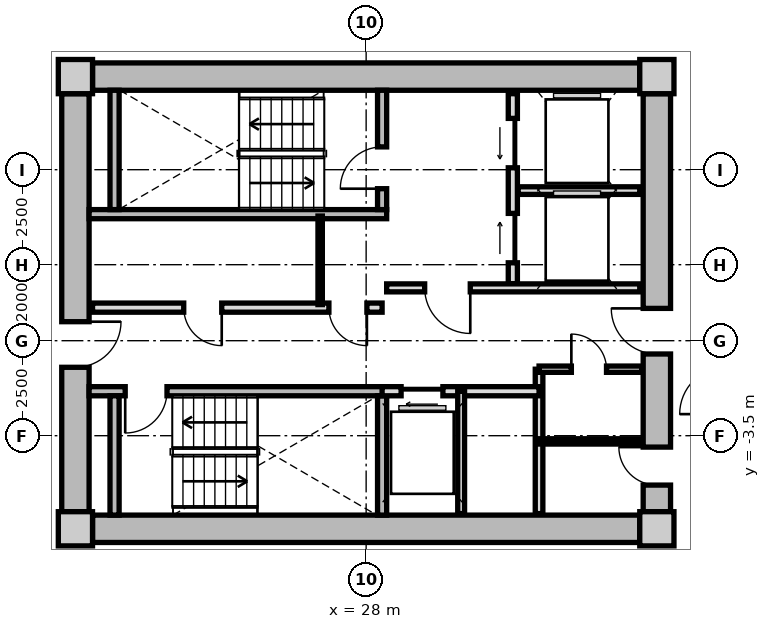
"""IFC4 building model, lengths in metres.
Left out: names, types, materials, properties, quantities, classifications, styles, units other than length and angle.
Written with IfcOpenShell. Run it as: python <this file> out.ifc"""

import sys

from ifc_helpers import new_model, si_unit, direction, frame, frame_2d, origin, origin_2d, place, context, subcontext, project, spatial, rectangle, extrude, source, transform, mapped, element, fill, save


model = new_model("IFC4")
c1 = context("Model", 3, precision=1e-05, world=origin(), true_north=direction((0.0, 1.0)))
c2 = subcontext(c1, "Body", "Model", "MODEL_VIEW")
j1 = project(units=[si_unit("LENGTHUNIT", "METRE"), si_unit("PLANEANGLEUNIT", "RADIAN")], contexts=[c1])
p1 = place(None, origin())
s1 = spatial("IfcSite", under=j1, at=p1, CompositionType="ELEMENT")
p2 = place(p1, origin())
s2 = spatial("IfcBuilding", under=s1, at=p2, CompositionType="ELEMENT")
p3 = place(p2, frame((0.0, 0.0, 96.25)))
s3 = spatial("IfcBuildingStorey", under=s2, at=p3, CompositionType="ELEMENT", Elevation=96.25)
m1 = source(origin(), c2, "Body", "SweptSolid", [
    extrude(rectangle(XDim=0.9, YDim=0.9, at=origin_2d()), origin(), (0.0, 0.0, 1.0), 3.05),
])
for number, where, z_axis, x_axis in (
    (1, (20.35, -5.95, 0.0), (0.0, 0.0, 1.0), (1.0, 0.0, 0.0)),
    (2, (35.65, -5.95, 0.0), (0.0, 0.0, 1.0), (1.0, 0.0, 0.0)),
    (3, (35.65, 5.95, 0.0), (0.0, 0.0, 1.0), (1.0, 0.0, 0.0)),
    (4, (20.35, 5.95, 0.0), (0.0, 0.0, 1.0), (1.0, 0.0, 0.0)),
):
    element("IfcColumn", number, at=place(p3, frame(where, z_axis=z_axis, x_axis=x_axis)), inside=s3, PredefinedType="COLUMN", context=c2, shape_type="MappedRepresentation", body=[
        mapped(m1, transform((0.0, 0.0, 0.0), x_axis=(1.0, 0.0, 0.0), y_axis=(0.0, 1.0, 0.0), z_axis=(0.0, 0.0, 1.0), scale=1.0)),
    ])
m2 = source(origin(), c2, "Body", "SweptSolid", [
    extrude(rectangle(XDim=14.4, YDim=0.72, at=frame_2d((7.2, 0.0))), origin(), (0.0, 0.0, 1.0), 2.79),
])
for number, where, z_axis, x_axis in (
    (5, (20.8, 5.95, 0.0), (0.0, 0.0, 1.0), (1.0, 0.0, 0.0)),
    (6, (35.2, -5.95, 0.0), (0.0, 0.0, 1.0), (-1.0, 0.0, 0.0)),
):
    element("IfcWall", number, at=place(p3, frame(where, z_axis=z_axis, x_axis=x_axis)), inside=s3, PredefinedType="SHEAR", context=c2, shape_type="MappedRepresentation", body=[
        mapped(m2, transform((0.0, 0.0, 0.0), x_axis=(1.0, 0.0, 0.0), y_axis=(0.0, 1.0, 0.0), z_axis=(0.0, 0.0, 1.0), scale=1.0)),
    ])
m3 = source(origin(), c2, "Body", "SweptSolid", [
    extrude(rectangle(XDim=11.0, YDim=0.72, at=frame_2d((5.5, 0.0))), origin(), (0.0, 0.0, 1.0), 2.79),
])
p4 = place(p3, frame((20.35, -5.5, 0.0), z_axis=(0.0, 0.0, 1.0), x_axis=(0.0, 1.0, 0.0)))
e7 = element("IfcWall", 7, at=p4, inside=s3, PredefinedType="SHEAR", context=c2, shape_type="MappedRepresentation", body=[
    mapped(m3, transform((0.0, 0.0, 0.0), x_axis=(1.0, 0.0, 0.0), y_axis=(0.0, 1.0, 0.0), z_axis=(0.0, 0.0, 1.0), scale=1.0)),
])
p5 = place(p4, frame((3.8, 0.0, 0.0)))
e8 = element("IfcOpeningElement", 8, at=p5, cuts=e7, PredefinedType="OPENING", context=c2, shape_type="SweptSolid", body=[
    extrude(rectangle(XDim=1.2, YDim=2.15, at=frame_2d((0.6, 1.075))), frame((0.0, 0.37, 0.0), z_axis=(0.0, -1.0, 0.0), x_axis=(1.0, 0.0, 0.0)), (0.0, 0.0, 1.0), 0.74),
])
p6 = place(p3, frame((35.65, 5.5, 0.0), z_axis=(0.0, 0.0, 1.0), x_axis=(0.0, -1.0, 0.0)))
e9 = element("IfcWall", 9, at=p6, inside=s3, PredefinedType="SHEAR", context=c2, shape_type="MappedRepresentation", body=[
    mapped(m3, transform((0.0, 0.0, 0.0), x_axis=(1.0, 0.0, 0.0), y_axis=(0.0, 1.0, 0.0), z_axis=(0.0, 0.0, 1.0), scale=1.0)),
])
p7 = place(p6, frame((5.65, 0.0, 0.0)))
e10 = element("IfcOpeningElement", 10, at=p7, cuts=e9, PredefinedType="OPENING", context=c2, shape_type="SweptSolid", body=[
    extrude(rectangle(XDim=1.2, YDim=2.15, at=frame_2d((0.6, 1.075))), frame((0.0, 0.37, 0.0), z_axis=(0.0, -1.0, 0.0), x_axis=(1.0, 0.0, 0.0)), (0.0, 0.0, 1.0), 0.74),
])
p8 = place(p6, frame((9.3, 0.0, 0.0)))
e11 = element("IfcOpeningElement", 11, at=p8, cuts=e9, PredefinedType="OPENING", context=c2, shape_type="SweptSolid", body=[
    extrude(rectangle(XDim=1.0, YDim=2.1, at=frame_2d((0.5, 1.05))), frame((0.0, 0.37, 0.0), z_axis=(0.0, -1.0, 0.0), x_axis=(1.0, 0.0, 0.0)), (0.0, 0.0, 1.0), 0.74),
])
m4 = source(origin(), c2, "Body", "SweptSolid", [
    extrude(rectangle(XDim=7.83, YDim=0.24, at=frame_2d((3.915, 0.0))), origin(), (0.0, 0.0, 1.0), 2.79),
])
p9 = place(p3, frame((20.71, 2.33, 0.0), z_axis=(0.0, 0.0, 1.0), x_axis=(1.0, 0.0, 0.0)))
e12 = element("IfcWall", 12, at=p9, inside=s3, PredefinedType="PARTITIONING", context=c2, shape_type="MappedRepresentation", body=[
    mapped(m4, transform((0.0, 0.0, 0.0), x_axis=(1.0, 0.0, 0.0), y_axis=(0.0, 1.0, 0.0), z_axis=(0.0, 0.0, 1.0), scale=1.0)),
])
m5 = source(origin(), c2, "Body", "SweptSolid", [
    extrude(rectangle(XDim=3.14, YDim=0.24, at=frame_2d((1.57, 0.0))), origin(), (0.0, 0.0, 1.0), 2.79),
])
p10 = place(p3, frame((21.38, 2.45, 0.0), z_axis=(0.0, 0.0, 1.0), x_axis=(0.0, 1.0, 0.0)))
e13 = element("IfcWall", 13, at=p10, inside=s3, PredefinedType="PARTITIONING", context=c2, shape_type="MappedRepresentation", body=[
    mapped(m5, transform((0.0, 0.0, 0.0), x_axis=(1.0, 0.0, 0.0), y_axis=(0.0, 1.0, 0.0), z_axis=(0.0, 0.0, 1.0), scale=1.0)),
])
p11 = place(p3, frame((28.42, 2.45, 0.0), z_axis=(0.0, 0.0, 1.0), x_axis=(0.0, 1.0, 0.0)))
e14 = element("IfcWall", 14, at=p11, inside=s3, PredefinedType="PARTITIONING", context=c2, shape_type="MappedRepresentation", body=[
    mapped(m5, transform((0.0, 0.0, 0.0), x_axis=(1.0, 0.0, 0.0), y_axis=(0.0, 1.0, 0.0), z_axis=(0.0, 0.0, 1.0), scale=1.0)),
])
p12 = place(p11, frame((0.55, 0.0, 0.0)))
e15 = element("IfcOpeningElement", 15, at=p12, cuts=e14, PredefinedType="OPENING", context=c2, shape_type="SweptSolid", body=[
    extrude(rectangle(XDim=1.1, YDim=2.15, at=frame_2d((0.55, 1.075))), frame((0.0, 0.13, 0.0), z_axis=(0.0, -1.0, 0.0), x_axis=(1.0, 0.0, 0.0)), (0.0, 0.0, 1.0), 0.26),
])
p13 = place(p3, frame((20.71, -2.33, 0.0), z_axis=(0.0, 0.0, 1.0), x_axis=(1.0, 0.0, 0.0)))
e16 = element("IfcWall", 16, at=p13, inside=s3, PredefinedType="PARTITIONING", context=c2, shape_type="MappedRepresentation", body=[
    mapped(m4, transform((0.0, 0.0, 0.0), x_axis=(1.0, 0.0, 0.0), y_axis=(0.0, 1.0, 0.0), z_axis=(0.0, 0.0, 1.0), scale=1.0)),
])
p14 = place(p13, frame((0.95, 0.0, 0.0)))
e17 = element("IfcOpeningElement", 17, at=p14, cuts=e16, PredefinedType="OPENING", context=c2, shape_type="SweptSolid", body=[
    extrude(rectangle(XDim=1.1, YDim=2.15, at=frame_2d((0.55, 1.075))), frame((0.0, 0.13, 0.0), z_axis=(0.0, -1.0, 0.0), x_axis=(1.0, 0.0, 0.0)), (0.0, 0.0, 1.0), 0.26),
])
for number, where, z_axis, x_axis in (
    (18, (21.38, -5.59, 0.0), (0.0, 0.0, 1.0), (0.0, 1.0, 0.0)),
    (19, (28.42, -5.59, 0.0), (0.0, 0.0, 1.0), (0.0, 1.0, 0.0)),
):
    element("IfcWall", number, at=place(p3, frame(where, z_axis=z_axis, x_axis=x_axis)), inside=s3, PredefinedType="PARTITIONING", context=c2, shape_type="MappedRepresentation", body=[
        mapped(m5, transform((0.0, 0.0, 0.0), x_axis=(1.0, 0.0, 0.0), y_axis=(0.0, 1.0, 0.0), z_axis=(0.0, 0.0, 1.0), scale=1.0)),
    ])
m6 = source(origin(), c2, "Body", "SweptSolid", [
    extrude(rectangle(XDim=5.0, YDim=0.24, at=frame_2d((2.5, 0.0))), origin(), (0.0, 0.0, 1.0), 2.775),
])
p15 = place(p3, frame((31.86, 0.5, 0.0), z_axis=(0.0, 0.0, 1.0), x_axis=(0.0, 1.0, 0.0)))
e20 = element("IfcWall", 20, at=p15, inside=s3, PredefinedType="PARTITIONING", context=c2, shape_type="MappedRepresentation", body=[
    mapped(m6, transform((0.0, 0.0, 0.0), x_axis=(1.0, 0.0, 0.0), y_axis=(0.0, 1.0, 0.0), z_axis=(0.0, 0.0, 1.0), scale=1.0)),
])
p16 = place(p15, frame((3.05, 0.0, 0.0)))
e21 = element("IfcOpeningElement", 21, at=p16, cuts=e20, PredefinedType="OPENING", context=c2, shape_type="SweptSolid", body=[
    extrude(rectangle(XDim=1.3, YDim=2.2, at=frame_2d((0.65, 1.1))), frame((0.0, 0.13, 0.0), z_axis=(0.0, -1.0, 0.0), x_axis=(1.0, 0.0, 0.0)), (0.0, 0.0, 1.0), 0.26),
])
p17 = place(p15, frame((0.55, 0.0, 0.0)))
e22 = element("IfcOpeningElement", 22, at=p17, cuts=e20, PredefinedType="OPENING", context=c2, shape_type="SweptSolid", body=[
    extrude(rectangle(XDim=1.3, YDim=2.2, at=frame_2d((0.65, 1.1))), frame((0.0, 0.13, 0.0), z_axis=(0.0, -1.0, 0.0), x_axis=(1.0, 0.0, 0.0)), (0.0, 0.0, 1.0), 0.26),
])
m7 = source(origin(), c2, "Body", "SweptSolid", [
    extrude(rectangle(XDim=3.2, YDim=0.2, at=frame_2d((1.6, 0.0))), origin(), (0.0, 0.0, 1.0), 2.775),
])
p18 = place(p3, frame((32.0, 2.95, 0.0), z_axis=(0.0, 0.0, 1.0), x_axis=(1.0, 0.0, 0.0)))
e23 = element("IfcWall", 23, at=p18, inside=s3, PredefinedType="PARTITIONING", context=c2, shape_type="MappedRepresentation", body=[
    mapped(m7, transform((0.0, 0.0, 0.0), x_axis=(1.0, 0.0, 0.0), y_axis=(0.0, 1.0, 0.0), z_axis=(0.0, 0.0, 1.0), scale=1.0)),
])
m8 = source(origin(), c2, "Body", "SweptSolid", [
    extrude(rectangle(XDim=6.66, YDim=0.21, at=frame_2d((3.33, 0.0))), origin(), (0.0, 0.0, 1.0), 2.775),
])
p19 = place(p3, frame((28.54, 0.39, 0.0), z_axis=(0.0, 0.0, 1.0), x_axis=(1.0, 0.0, 0.0)))
e24 = element("IfcWall", 24, at=p19, inside=s3, PredefinedType="PARTITIONING", context=c2, shape_type="MappedRepresentation", body=[
    mapped(m8, transform((0.0, 0.0, 0.0), x_axis=(1.0, 0.0, 0.0), y_axis=(0.0, 1.0, 0.0), z_axis=(0.0, 0.0, 1.0), scale=1.0)),
])
p20 = place(p19, frame((1.0, 0.0, 0.0)))
e25 = element("IfcOpeningElement", 25, at=p20, cuts=e24, PredefinedType="OPENING", context=c2, shape_type="SweptSolid", body=[
    extrude(rectangle(XDim=1.2, YDim=2.15, at=frame_2d((0.6, 1.075))), frame((0.0, 0.115, 0.0), z_axis=(0.0, -1.0, 0.0), x_axis=(1.0, 0.0, 0.0)), (0.0, 0.0, 1.0), 0.23),
])
m9 = source(origin(), c2, "Body", "SweptSolid", [
    extrude(rectangle(XDim=7.62, YDim=0.24, at=frame_2d((3.81, 0.0))), origin(), (0.0, 0.0, 1.0), 2.775),
])
p21 = place(p3, frame((20.8, -0.13, 0.0), z_axis=(0.0, 0.0, 1.0), x_axis=(1.0, 0.0, 0.0)))
e26 = element("IfcWall", 26, at=p21, inside=s3, PredefinedType="PARTITIONING", context=c2, shape_type="MappedRepresentation", body=[
    mapped(m9, transform((0.0, 0.0, 0.0), x_axis=(1.0, 0.0, 0.0), y_axis=(0.0, 1.0, 0.0), z_axis=(0.0, 0.0, 1.0), scale=1.0)),
])
p22 = place(p21, frame((6.22, 0.0, 0.0)))
e27 = element("IfcOpeningElement", 27, at=p22, cuts=e26, PredefinedType="OPENING", context=c2, shape_type="SweptSolid", body=[
    extrude(rectangle(XDim=1.0, YDim=2.1, at=frame_2d((0.5, 1.05))), frame((0.0, 0.13, 0.0), z_axis=(0.0, -1.0, 0.0), x_axis=(1.0, 0.0, 0.0)), (0.0, 0.0, 1.0), 0.26),
])
p23 = place(p21, frame((2.4, 0.0, 0.0)))
e28 = element("IfcOpeningElement", 28, at=p23, cuts=e26, PredefinedType="OPENING", context=c2, shape_type="SweptSolid", body=[
    extrude(rectangle(XDim=1.0, YDim=2.1, at=frame_2d((0.5, 1.05))), frame((0.0, 0.13, 0.0), z_axis=(0.0, -1.0, 0.0), x_axis=(1.0, 0.0, 0.0)), (0.0, 0.0, 1.0), 0.26),
])
m10 = source(origin(), c2, "Body", "SweptSolid", [
    extrude(rectangle(XDim=2.33, YDim=0.115, at=frame_2d((1.165, 0.0))), origin(), (0.0, 0.0, 1.0), 2.775),
])
p24 = place(p3, frame((26.79, -0.05, 0.0), z_axis=(0.0, 0.0, 1.0), x_axis=(0.0, 1.0, 0.0)))
e29 = element("IfcWall", 29, at=p24, inside=s3, PredefinedType="PARTITIONING", context=c2, shape_type="MappedRepresentation", body=[
    mapped(m10, transform((0.0, 0.0, 0.0), x_axis=(1.0, 0.0, 0.0), y_axis=(0.0, 1.0, 0.0), z_axis=(0.0, 0.0, 1.0), scale=1.0)),
])
m11 = source(origin(), c2, "Body", "SweptSolid", [
    extrude(rectangle(XDim=3.8, YDim=0.2, at=frame_2d((1.9, 0.0))), origin(), (0.0, 0.0, 1.0), 2.775),
])
p25 = place(p3, frame((32.55, -5.55, 0.0), z_axis=(0.0, 0.0, 1.0), x_axis=(0.0, 1.0, 0.0)))
e30 = element("IfcWall", 30, at=p25, inside=s3, PredefinedType="PARTITIONING", context=c2, shape_type="MappedRepresentation", body=[
    mapped(m11, transform((0.0, 0.0, 0.0), x_axis=(1.0, 0.0, 0.0), y_axis=(0.0, 1.0, 0.0), z_axis=(0.0, 0.0, 1.0), scale=1.0)),
])
m12 = source(origin(), c2, "Body", "SweptSolid", [
    extrude(rectangle(XDim=4.13, YDim=0.24, at=frame_2d((2.065, 0.0))), origin(), (0.0, 0.0, 1.0), 2.775),
])
p26 = place(p3, frame((28.42, -2.33, 0.0), z_axis=(0.0, 0.0, 1.0), x_axis=(1.0, 0.0, 0.0)))
e31 = element("IfcWall", 31, at=p26, inside=s3, PredefinedType="PARTITIONING", context=c2, shape_type="MappedRepresentation", body=[
    mapped(m12, transform((0.0, 0.0, 0.0), x_axis=(1.0, 0.0, 0.0), y_axis=(0.0, 1.0, 0.0), z_axis=(0.0, 0.0, 1.0), scale=1.0)),
])
p27 = place(p26, frame((0.5, 0.0, 0.0)))
e32 = element("IfcOpeningElement", 32, at=p27, cuts=e31, PredefinedType="OPENING", context=c2, shape_type="SweptSolid", body=[
    extrude(rectangle(XDim=1.1, YDim=2.2, at=frame_2d((0.55, 1.1))), frame((0.0, 0.13, 0.0), z_axis=(0.0, -1.0, 0.0), x_axis=(1.0, 0.0, 0.0)), (0.0, 0.0, 1.0), 0.26),
])
m13 = source(origin(), c2, "Body", "SweptSolid", [
    extrude(rectangle(XDim=3.22, YDim=0.18, at=frame_2d((1.61, 0.0))), origin(), (0.0, 0.0, 1.0), 2.775),
])
p28 = place(p3, frame((30.5, -5.55, 0.0), z_axis=(0.0, 0.0, 1.0), x_axis=(0.0, 1.0, 0.0)))
e33 = element("IfcWall", 33, at=p28, inside=s3, PredefinedType="PARTITIONING", context=c2, shape_type="MappedRepresentation", body=[
    mapped(m13, transform((0.0, 0.0, 0.0), x_axis=(1.0, 0.0, 0.0), y_axis=(0.0, 1.0, 0.0), z_axis=(0.0, 0.0, 1.0), scale=1.0)),
])
m14 = source(origin(), c2, "Body", "SweptSolid", [
    extrude(rectangle(XDim=2.7, YDim=0.165, at=frame_2d((1.35, 0.0))), origin(), (0.0, 0.0, 1.0), 2.775),
])
p29 = place(p3, frame((32.55, -1.75, 0.0), z_axis=(0.0, 0.0, 1.0), x_axis=(1.0, 0.0, 0.0)))
e34 = element("IfcWall", 34, at=p29, inside=s3, PredefinedType="PARTITIONING", context=c2, shape_type="MappedRepresentation", body=[
    mapped(m14, transform((0.0, 0.0, 0.0), x_axis=(1.0, 0.0, 0.0), y_axis=(0.0, 1.0, 0.0), z_axis=(0.0, 0.0, 1.0), scale=1.0)),
])
p30 = place(p29, frame((0.85, 0.0, 0.0)))
e35 = element("IfcOpeningElement", 35, at=p30, cuts=e34, PredefinedType="OPENING", context=c2, shape_type="SweptSolid", body=[
    extrude(rectangle(XDim=0.925, YDim=2.1, at=frame_2d((0.462, 1.05))), frame((0.0, 0.093, 0.0), z_axis=(0.0, -1.0, 0.0), x_axis=(1.0, 0.0, 0.0)), (0.0, 0.0, 1.0), 0.185),
])
m15 = source(origin(), c2, "Body", "SweptSolid", [
    extrude(rectangle(XDim=2.7, YDim=0.14, at=frame_2d((1.35, 0.0))), origin(), (0.0, 0.0, 1.0), 2.775),
])
p31 = place(p3, frame((32.55, -3.65, 0.0), z_axis=(0.0, 0.0, 1.0), x_axis=(1.0, 0.0, 0.0)))
e36 = element("IfcWall", 36, at=p31, inside=s3, PredefinedType="PARTITIONING", context=c2, shape_type="MappedRepresentation", body=[
    mapped(m15, transform((0.0, 0.0, 0.0), x_axis=(1.0, 0.0, 0.0), y_axis=(0.0, 1.0, 0.0), z_axis=(0.0, 0.0, 1.0), scale=1.0)),
])
m16 = source(origin(), c2, "Body", "SweptSolid", [
    extrude(rectangle(XDim=1.1, YDim=2.15, at=frame_2d((0.55, 1.075))), frame((0.0, 0.025, 0.0), z_axis=(0.0, -1.0, 0.0), x_axis=(1.0, 0.0, 0.0)), (0.0, 0.0, 1.0), 0.05),
])
p32 = place(p12, origin())
e37 = element("IfcDoor", 37, at=p32, inside=s3, OperationType="SINGLE_SWING_LEFT", PredefinedType="DOOR", context=c2, shape_type="MappedRepresentation", body=[
    mapped(m16, transform((0.0, 0.0, 0.0), x_axis=(1.0, 0.0, 0.0), y_axis=(0.0, 1.0, 0.0), z_axis=(0.0, 0.0, 1.0), scale=1.0)),
])
fill(e15, e37)
p33 = place(p14, frame((1.1, 0.0, 0.0), z_axis=(0.0, 0.0, 1.0), x_axis=(-1.0, 0.0, 0.0)))
e38 = element("IfcDoor", 38, at=p33, inside=s3, OperationType="SINGLE_SWING_RIGHT", PredefinedType="DOOR", context=c2, shape_type="MappedRepresentation", body=[
    mapped(m16, transform((0.0, 0.0, 0.0), x_axis=(1.0, 0.0, 0.0), y_axis=(0.0, 1.0, 0.0), z_axis=(0.0, 0.0, 1.0), scale=1.0)),
])
fill(e17, e38)
m17 = source(origin(), c2, "Body", "SweptSolid", [
    extrude(rectangle(XDim=1.3, YDim=2.2, at=frame_2d((0.65, 1.1))), frame((0.0, 0.025, 0.0), z_axis=(0.0, -1.0, 0.0), x_axis=(1.0, 0.0, 0.0)), (0.0, 0.0, 1.0), 0.05),
])
p34 = place(p16, origin())
e39 = element("IfcDoor", 39, at=p34, inside=s3, OperationType="SLIDING_TO_LEFT", PredefinedType="DOOR", context=c2, shape_type="MappedRepresentation", body=[
    mapped(m17, transform((0.0, 0.0, 0.0), x_axis=(1.0, 0.0, 0.0), y_axis=(0.0, 1.0, 0.0), z_axis=(0.0, 0.0, 1.0), scale=1.0)),
])
fill(e21, e39)
p35 = place(p17, origin())
e40 = element("IfcDoor", 40, at=p35, inside=s3, OperationType="SLIDING_TO_RIGHT", PredefinedType="DOOR", context=c2, shape_type="MappedRepresentation", body=[
    mapped(m17, transform((0.0, 0.0, 0.0), x_axis=(1.0, 0.0, 0.0), y_axis=(0.0, 1.0, 0.0), z_axis=(0.0, 0.0, 1.0), scale=1.0)),
])
fill(e22, e40)
m18 = source(origin(), c2, "Body", "SweptSolid", [
    extrude(rectangle(XDim=1.2, YDim=2.15, at=frame_2d((0.6, 1.075))), frame((0.0, 0.025, 0.0), z_axis=(0.0, -1.0, 0.0), x_axis=(1.0, 0.0, 0.0)), (0.0, 0.0, 1.0), 0.05),
])
p36 = place(p20, frame((1.2, 0.0, 0.0), z_axis=(0.0, 0.0, 1.0), x_axis=(-1.0, 0.0, 0.0)))
e41 = element("IfcDoor", 41, at=p36, inside=s3, OperationType="SINGLE_SWING_LEFT", PredefinedType="DOOR", context=c2, shape_type="MappedRepresentation", body=[
    mapped(m18, transform((0.0, 0.0, 0.0), x_axis=(1.0, 0.0, 0.0), y_axis=(0.0, 1.0, 0.0), z_axis=(0.0, 0.0, 1.0), scale=1.0)),
])
fill(e25, e41)
p37 = place(p5, frame((1.2, 0.0, 0.0), z_axis=(0.0, 0.0, 1.0), x_axis=(-1.0, 0.0, 0.0)))
e42 = element("IfcDoor", 42, at=p37, inside=s3, OperationType="SINGLE_SWING_LEFT", PredefinedType="DOOR", context=c2, shape_type="MappedRepresentation", body=[
    mapped(m18, transform((0.0, 0.0, 0.0), x_axis=(1.0, 0.0, 0.0), y_axis=(0.0, 1.0, 0.0), z_axis=(0.0, 0.0, 1.0), scale=1.0)),
])
fill(e8, e42)
p38 = place(p7, frame((1.2, 0.0, 0.0), z_axis=(0.0, 0.0, 1.0), x_axis=(-1.0, 0.0, 0.0)))
e43 = element("IfcDoor", 43, at=p38, inside=s3, OperationType="SINGLE_SWING_RIGHT", PredefinedType="DOOR", context=c2, shape_type="MappedRepresentation", body=[
    mapped(m18, transform((0.0, 0.0, 0.0), x_axis=(1.0, 0.0, 0.0), y_axis=(0.0, 1.0, 0.0), z_axis=(0.0, 0.0, 1.0), scale=1.0)),
])
fill(e10, e43)
m19 = source(origin(), c2, "Body", "SweptSolid", [
    extrude(rectangle(XDim=1.0, YDim=2.1, at=frame_2d((0.5, 1.05))), frame((0.0, 0.025, 0.0), z_axis=(0.0, -1.0, 0.0), x_axis=(1.0, 0.0, 0.0)), (0.0, 0.0, 1.0), 0.05),
])
p39 = place(p22, frame((1.0, 0.0, 0.0), z_axis=(0.0, 0.0, 1.0), x_axis=(-1.0, 0.0, 0.0)))
e44 = element("IfcDoor", 44, at=p39, inside=s3, OperationType="SINGLE_SWING_LEFT", PredefinedType="DOOR", context=c2, shape_type="MappedRepresentation", body=[
    mapped(m19, transform((0.0, 0.0, 0.0), x_axis=(1.0, 0.0, 0.0), y_axis=(0.0, 1.0, 0.0), z_axis=(0.0, 0.0, 1.0), scale=1.0)),
])
fill(e27, e44)
p40 = place(p23, frame((1.0, 0.0, 0.0), z_axis=(0.0, 0.0, 1.0), x_axis=(-1.0, 0.0, 0.0)))
e45 = element("IfcDoor", 45, at=p40, inside=s3, OperationType="SINGLE_SWING_LEFT", PredefinedType="DOOR", context=c2, shape_type="MappedRepresentation", body=[
    mapped(m19, transform((0.0, 0.0, 0.0), x_axis=(1.0, 0.0, 0.0), y_axis=(0.0, 1.0, 0.0), z_axis=(0.0, 0.0, 1.0), scale=1.0)),
])
fill(e28, e45)
m20 = source(origin(), c2, "Body", "SweptSolid", [
    extrude(rectangle(XDim=1.1, YDim=2.2, at=frame_2d((0.55, 1.1))), frame((0.0, 0.025, 0.0), z_axis=(0.0, -1.0, 0.0), x_axis=(1.0, 0.0, 0.0)), (0.0, 0.0, 1.0), 0.05),
])
p41 = place(p27, frame((1.1, 0.0, 0.0), z_axis=(0.0, 0.0, 1.0), x_axis=(-1.0, 0.0, 0.0)))
e46 = element("IfcDoor", 46, at=p41, inside=s3, OperationType="SLIDING_TO_LEFT", PredefinedType="DOOR", context=c2, shape_type="MappedRepresentation", body=[
    mapped(m20, transform((0.0, 0.0, 0.0), x_axis=(1.0, 0.0, 0.0), y_axis=(0.0, 1.0, 0.0), z_axis=(0.0, 0.0, 1.0), scale=1.0)),
])
fill(e32, e46)
m21 = source(origin(), c2, "Body", "SweptSolid", [
    extrude(rectangle(XDim=0.925, YDim=2.1, at=frame_2d((0.462, 1.05))), frame((0.0, 0.025, 0.0), z_axis=(0.0, -1.0, 0.0), x_axis=(1.0, 0.0, 0.0)), (0.0, 0.0, 1.0), 0.05),
])
p42 = place(p30, origin())
e47 = element("IfcDoor", 47, at=p42, inside=s3, OperationType="SINGLE_SWING_LEFT", PredefinedType="DOOR", context=c2, shape_type="MappedRepresentation", body=[
    mapped(m21, transform((0.0, 0.0, 0.0), x_axis=(1.0, 0.0, 0.0), y_axis=(0.0, 1.0, 0.0), z_axis=(0.0, 0.0, 1.0), scale=1.0)),
])
fill(e35, e47)
p43 = place(p8, frame((1.0, 0.0, 0.0), z_axis=(0.0, 0.0, 1.0), x_axis=(-1.0, 0.0, 0.0)))
e48 = element("IfcDoor", 48, at=p43, inside=s3, OperationType="SINGLE_SWING_RIGHT", PredefinedType="DOOR", context=c2, shape_type="MappedRepresentation", body=[
    mapped(m19, transform((0.0, 0.0, 0.0), x_axis=(1.0, 0.0, 0.0), y_axis=(0.0, 1.0, 0.0), z_axis=(0.0, 0.0, 1.0), scale=1.0)),
])
fill(e11, e48)
save(model, sys.argv[1])
